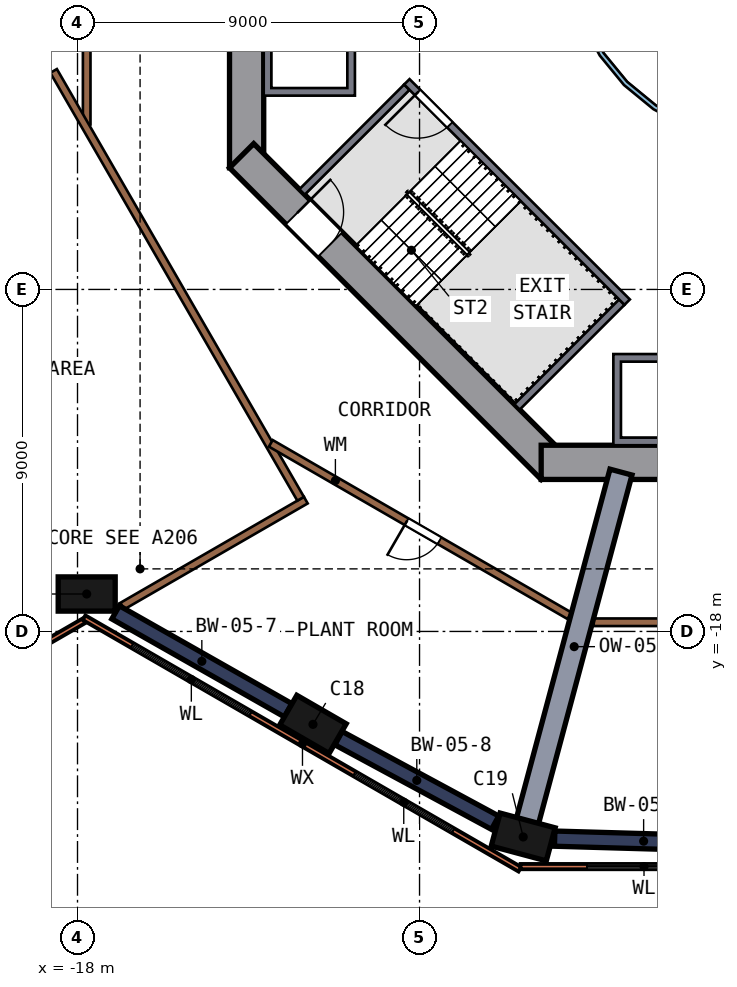
"""IFC4 building model, lengths in metres.
Left out: names, types, materials, properties, quantities, classifications, styles, units other than length and angle.
Written with IfcOpenShell. Run it as: python <this file> out.ifc"""

import sys

from ifc_helpers import new_model, si_unit, direction, frame, frame_2d, origin, origin_2d, place, context, subcontext, project, spatial, polyline, rectangle, outline, extrude, element, fill, save


model = new_model("IFC4")
c1 = context("Model", 3, precision=1e-05, world=origin(), true_north=direction((0.0, 1.0)))
c2 = subcontext(c1, "Body", "Model", "MODEL_VIEW")
j1 = project(units=[si_unit("LENGTHUNIT", "METRE"), si_unit("PLANEANGLEUNIT", "RADIAN")], contexts=[c1])
p1 = place(None, origin())
s1 = spatial("IfcSite", under=j1, at=p1, CompositionType="ELEMENT")
p2 = place(p1, origin())
s2 = spatial("IfcBuilding", under=s1, at=p2, CompositionType="ELEMENT")
p3 = place(p2, frame((0.0, 0.0, 28.0)))
s3 = spatial("IfcBuildingStorey", under=s2, at=p3, CompositionType="ELEMENT", Elevation=28.0)
p4 = place(p3, frame((-17.758, -17.065, 0.0), z_axis=(0.0, 0.042279868, 0.999105807), x_axis=(-1.0, 0.0, 0.0)))
e1 = element("IfcColumn", 1, at=p4, inside=s3, PredefinedType="COLUMN", context=c2, shape_type="SweptSolid", body=[
    extrude(rectangle(XDim=1.5, YDim=0.9, at=origin_2d()), origin(), (0.0, 0.0, 1.0), 4.504),
])
p5 = place(p3, frame((-11.804, -20.445, 0.0), z_axis=(0.0, 0.0, 1.0), x_axis=(0.866025404, -0.5, 0.0)))
e2 = element("IfcColumn", 2, at=p5, inside=s3, PredefinedType="COLUMN", context=c2, shape_type="SweptSolid", body=[
    extrude(rectangle(XDim=1.5, YDim=0.9, at=origin_2d()), origin(), (0.0, 0.0, 1.0), 4.5),
])
p6 = place(p3, frame((-6.278, -23.428, 0.0), z_axis=(0.004448124, 0.016653341, 0.999851429), x_axis=(-0.966130395, 0.258054373, 0.0)))
e3 = element("IfcColumn", 3, at=p6, inside=s3, PredefinedType="COLUMN", context=c2, shape_type="SweptSolid", body=[
    extrude(rectangle(XDim=1.5, YDim=0.9, at=origin_2d()), origin(), (0.0, 0.0, 1.0), 4.501),
])
p7 = place(p3, frame((-13.55, 5.799, 0.0), z_axis=(0.0, 0.0, 1.0), x_axis=(0.0, -1.0, 0.0)))
e4 = element("IfcWall", 4, at=p7, inside=s3, PredefinedType="SHEAR", context=c2, shape_type="SweptSolid", body=[
    extrude(rectangle(XDim=11.598, YDim=0.9, at=frame_2d((5.799, 0.0))), origin(), (0.0, 0.0, 1.0), 6.0),
])
p8 = place(p7, frame((4.899, 0.0, 0.0)))
e5 = element("IfcOpeningElement", 5, at=p8, cuts=e4, PredefinedType="OPENING", context=c2, shape_type="SweptSolid", body=[
    extrude(rectangle(XDim=1.8, YDim=2.1, at=frame_2d((0.9, 1.05))), frame((0.0, 0.46, 0.0), z_axis=(0.0, -1.0, 0.0), x_axis=(1.0, 0.0, 0.0)), (0.0, 0.0, 1.0), 0.92),
])
p9 = place(p3, frame((-13.682, -5.481, 0.0), z_axis=(0.0, 0.0, 1.0), x_axis=(0.707106781, -0.707106781, 0.0)))
e6 = element("IfcWall", 6, at=p9, inside=s3, PredefinedType="SHEAR", context=c2, shape_type="SweptSolid", body=[
    extrude(rectangle(XDim=11.598, YDim=0.9, at=frame_2d((5.799, 0.0))), origin(), (0.0, 0.0, 1.0), 6.0),
])
p10 = place(p9, frame((2.099, 0.0, 0.0)))
e7 = element("IfcOpeningElement", 7, at=p10, cuts=e6, PredefinedType="OPENING", context=c2, shape_type="SweptSolid", body=[
    extrude(rectangle(XDim=1.2, YDim=2.1, at=frame_2d((0.6, 1.05))), frame((0.0, 0.46, 0.0), z_axis=(0.0, -1.0, 0.0), x_axis=(1.0, 0.0, 0.0)), (0.0, 0.0, 1.0), 0.92),
])
p11 = place(p3, frame((-5.799, -13.55, 0.0), z_axis=(0.0, 0.0, 1.0), x_axis=(1.0, 0.0, 0.0)))
e8 = element("IfcWall", 8, at=p11, inside=s3, PredefinedType="SHEAR", context=c2, shape_type="SweptSolid", body=[
    extrude(rectangle(XDim=11.598, YDim=0.9, at=frame_2d((5.799, 0.0))), origin(), (0.0, 0.0, 1.0), 6.0),
])
p12 = place(p11, frame((4.899, 0.0, 0.0)))
e9 = element("IfcOpeningElement", 9, at=p12, cuts=e8, PredefinedType="OPENING", context=c2, shape_type="SweptSolid", body=[
    extrude(rectangle(XDim=1.8, YDim=2.1, at=frame_2d((0.9, 1.05))), frame((0.0, 0.46, 0.0), z_axis=(0.0, -1.0, 0.0), x_axis=(1.0, 0.0, 0.0)), (0.0, 0.0, 1.0), 0.92),
])
p13 = place(p3, frame((-16.998, -17.497, 0.0), z_axis=(0.0, 0.0, 1.0), x_axis=(0.869667461, -0.493638034, 0.0)))
e10 = element("IfcWall", 10, at=p13, inside=s3, PredefinedType="SHEAR", context=c2, shape_type="SweptSolid", body=[
    extrude(rectangle(XDim=5.219, YDim=0.4, at=frame_2d((2.609, 0.0))), origin(), (0.0, 0.0, 1.0), 4.5),
])
p14 = place(p3, frame((-11.133, -20.808, 0.0), z_axis=(0.0, 0.0, 1.0), x_axis=(0.879988629, -0.474994751, 0.0)))
e11 = element("IfcWall", 11, at=p14, inside=s3, PredefinedType="SHEAR", context=c2, shape_type="SweptSolid", body=[
    extrude(rectangle(XDim=4.684, YDim=0.4, at=frame_2d((2.342, 0.0))), origin(), (0.0, 0.0, 1.0), 4.5),
])
p15 = place(p3, frame((-5.444, -23.452, 0.0), z_axis=(0.0, 0.0, 1.0), x_axis=(0.99958902, -0.028666908, 0.0)))
e12 = element("IfcWall", 12, at=p15, inside=s3, PredefinedType="SHEAR", context=c2, shape_type="SweptSolid", body=[
    extrude(rectangle(XDim=4.684, YDim=0.4, at=frame_2d((2.342, 0.0))), origin(), (0.0, 0.0, 1.0), 4.5),
])
p16 = place(p3, frame((-3.699, -13.807, 0.0), z_axis=(0.0, 0.0, 1.0), x_axis=(-0.258827184, -0.965923645, 0.0)))
e13 = element("IfcWall", 13, at=p16, inside=s3, PredefinedType="SHEAR", context=c2, shape_type="SweptSolid", body=[
    extrude(rectangle(XDim=9.511, YDim=0.6, at=frame_2d((4.755, 0.0))), origin(), (0.0, 0.0, 1.0), 4.5),
])
p17 = place(p3, frame((-27.321, -23.198, 0.0), z_axis=(0.0, 0.0, 1.0), x_axis=(0.866030546, 0.499991093, 0.0)))
e14 = element("IfcWall", 14, at=p17, inside=s3, PredefinedType="SOLIDWALL", context=c2, shape_type="SweptSolid", body=[
    extrude(rectangle(XDim=10.961, YDim=0.14, at=frame_2d((5.48, 0.0))), origin(), (0.0, 0.0, 1.0), 4.5),
])
p18 = place(p17, frame((6.702, 0.0, 0.9)))
e15 = element("IfcOpeningElement", 15, at=p18, cuts=e14, PredefinedType="OPENING", context=c2, shape_type="SweptSolid", body=[
    extrude(rectangle(XDim=3.0, YDim=3.3, at=frame_2d((1.5, 1.65))), frame((0.0, 0.08, 0.0), z_axis=(0.0, -1.0, 0.0), x_axis=(1.0, 0.0, 0.0)), (0.0, 0.0, 1.0), 0.16),
])
p19 = place(p3, frame((-17.828, -17.637, 0.0), z_axis=(0.0, 0.0, 1.0), x_axis=(0.866029009, -0.499993756, 0.0)))
e16 = element("IfcWall", 16, at=p19, inside=s3, PredefinedType="SOLIDWALL", context=c2, shape_type="SweptSolid", body=[
    extrude(rectangle(XDim=13.242, YDim=0.14, at=frame_2d((6.621, 0.0))), origin(), (0.0, 0.0, 1.0), 4.5),
])
p20 = place(p19, frame((1.46, 0.0, 0.9)))
e17 = element("IfcOpeningElement", 17, at=p20, cuts=e16, PredefinedType="OPENING", context=c2, shape_type="SweptSolid", body=[
    extrude(rectangle(XDim=3.6, YDim=3.3, at=frame_2d((1.8, 1.65))), frame((0.0, 0.08, 0.0), z_axis=(0.0, -1.0, 0.0), x_axis=(1.0, 0.0, 0.0)), (0.0, 0.0, 1.0), 0.16),
])
p21 = place(p19, frame((8.215, 0.0, 0.9)))
e18 = element("IfcOpeningElement", 18, at=p21, cuts=e16, PredefinedType="OPENING", context=c2, shape_type="SweptSolid", body=[
    extrude(rectangle(XDim=3.0, YDim=3.3, at=frame_2d((1.5, 1.65))), frame((0.0, 0.08, 0.0), z_axis=(0.0, -1.0, 0.0), x_axis=(1.0, 0.0, 0.0)), (0.0, 0.0, 1.0), 0.16),
])
p22 = place(p3, frame((-6.341, -24.188, 0.0), z_axis=(0.0, 0.0, 1.0), x_axis=(1.0, 0.0, 0.0)))
e19 = element("IfcWall", 19, at=p22, inside=s3, PredefinedType="SOLIDWALL", context=c2, shape_type="SweptSolid", body=[
    extrude(rectangle(XDim=12.962, YDim=0.14, at=frame_2d((6.481, 0.0))), origin(), (0.0, 0.0, 1.0), 4.5),
])
p23 = place(p22, frame((1.748, 0.0, 0.9)))
e20 = element("IfcOpeningElement", 20, at=p23, cuts=e19, PredefinedType="OPENING", context=c2, shape_type="SweptSolid", body=[
    extrude(rectangle(XDim=3.0, YDim=3.3, at=frame_2d((1.5, 1.65))), frame((0.0, 0.08, 0.0), z_axis=(0.0, -1.0, 0.0), x_axis=(1.0, 0.0, 0.0)), (0.0, 0.0, 1.0), 0.16),
])
p24 = place(p22, frame((7.935, 0.0, 0.9)))
e21 = element("IfcOpeningElement", 21, at=p24, cuts=e19, PredefinedType="OPENING", context=c2, shape_type="SweptSolid", body=[
    extrude(rectangle(XDim=3.0, YDim=3.3, at=frame_2d((1.5, 1.65))), frame((0.0, 0.08, 0.0), z_axis=(0.0, -1.0, 0.0), x_axis=(1.0, 0.0, 0.0)), (0.0, 0.0, 1.0), 0.16),
])
p25 = place(p3, origin())
e22 = element("IfcWall", 22, at=p25, inside=s3, PredefinedType="SOLIDWALL", context=c2, shape_type="SweptSolid", body=[
    extrude(outline(polyline([(-10.7, -3.9), (-13.1, -3.9), (-13.1, -1.2), (-10.7, -1.2), (-10.7, -3.9)]), holes=[polyline([(-12.9, -1.4), (-12.9, -3.7), (-10.9, -3.7), (-10.9, -1.4), (-12.9, -1.4)])]), origin(), (0.0, 0.0, 1.0), 5.55),
])
p26 = place(p3, origin())
e23 = element("IfcWall", 23, at=p26, inside=s3, PredefinedType="SOLIDWALL", context=c2, shape_type="SweptSolid", body=[
    extrude(outline(polyline([(-1.2, -13.1), (-3.9, -13.1), (-3.9, -10.7), (-1.2, -10.7), (-1.2, -13.1)]), holes=[polyline([(-3.7, -10.9), (-3.7, -12.9), (-1.4, -12.9), (-1.4, -10.9), (-3.7, -10.9)])]), origin(), (0.0, 0.0, 1.0), 5.55),
])
p27 = place(p3, frame((-3.535, -9.334, 0.0), z_axis=(0.0, 0.0, 1.0), x_axis=(-0.707106781, 0.707106781, 0.0)))
e24 = element("IfcWall", 24, at=p27, inside=s3, PredefinedType="SOLIDWALL", context=c2, shape_type="SweptSolid", body=[
    extrude(rectangle(XDim=8.2, YDim=0.2, at=frame_2d((4.1, 0.0))), origin(), (0.0, 0.0, 1.0), 5.55),
])
p28 = place(p27, frame((6.6, 0.0, 0.0)))
e25 = element("IfcOpeningElement", 25, at=p28, cuts=e24, PredefinedType="OPENING", context=c2, shape_type="SweptSolid", body=[
    extrude(rectangle(XDim=1.2, YDim=2.1, at=frame_2d((0.6, 1.05))), frame((0.0, 0.11, 0.0), z_axis=(0.0, -1.0, 0.0), x_axis=(1.0, 0.0, 0.0)), (0.0, 0.0, 1.0), 0.22),
])
for number, where, z_axis, x_axis in (
    (26, (-9.334, -3.677, 0.0), (0.0, 0.0, 1.0), (-0.707, -0.707, 0.0)),
    (27, (-3.677, -9.334, 0.0), (0.0, 0.0, 1.0), (-0.707, -0.707, 0.0)),
):
    element("IfcWall", number, at=place(p3, frame(where, z_axis=z_axis, x_axis=x_axis)), inside=s3, PredefinedType="SOLIDWALL", context=c2, shape_type="SweptSolid", body=[
        extrude(rectangle(XDim=3.9, YDim=0.2, at=frame_2d((1.95, 0.0))), origin(), (0.0, 0.0, 1.0), 5.55),
    ])
p29 = place(p3, origin())
e28 = element("IfcWall", 28, at=p29, inside=s3, PredefinedType="SOLIDWALL", context=c2, shape_type="SweptSolid", body=[
    extrude(outline(polyline([(5.021, -0.999), (4.73, -1.959), (4.257, -2.844), (3.62, -3.62), (2.844, -4.257), (1.959, -4.73), (0.999, -5.021), (0.0, -5.12), (-0.999, -5.021), (-1.959, -4.73), (-2.844, -4.257), (-3.62, -3.62), (-4.257, -2.844), (-4.73, -1.959), (-5.021, -0.999), (-5.12, 0.0), (-5.021, 0.999), (-4.73, 1.959), (-4.257, 2.844), (-3.62, 3.62), (-2.844, 4.257), (-1.959, 4.73), (-0.999, 5.021), (0.0, 5.12), (0.999, 5.021), (1.959, 4.73), (2.844, 4.257), (3.62, 3.62), (4.257, 2.844), (4.73, 1.959), (5.021, 0.999), (5.12, 0.0), (5.021, -0.999)]), holes=[polyline([(4.904, 0.976), (4.619, 1.913), (4.157, 2.778), (3.535, 3.535), (2.778, 4.157), (1.913, 4.619), (0.976, 4.904), (0.0, 5.0), (-0.976, 4.904), (-1.913, 4.619), (-2.778, 4.157), (-3.535, 3.535), (-4.157, 2.778), (-4.619, 1.913), (-4.904, 0.976), (-5.0, 0.0), (-4.904, -0.976), (-4.619, -1.913), (-4.157, -2.778), (-3.535, -3.535), (-2.778, -4.157), (-1.913, -4.619), (-0.976, -4.904), (0.0, -5.0), (0.976, -4.904), (1.913, -4.619), (2.778, -4.157), (3.535, -3.535), (4.157, -2.778), (4.619, -1.913), (4.904, -0.976), (5.0, 0.0), (4.904, 0.976)])]), origin(), (0.0, 0.0, 1.0), 5.55),
])
p30 = place(p3, frame((-17.758, -4.658, 0.0), z_axis=(0.0, 0.0, 1.0), x_axis=(0.0, 1.0, 0.0)))
e29 = element("IfcWall", 29, at=p30, inside=s3, PredefinedType="SOLIDWALL", context=c2, shape_type="SweptSolid", body=[
    extrude(rectangle(XDim=9.075, YDim=0.2, at=frame_2d((4.538, 0.0))), origin(), (0.0, 0.0, 1.0), 4.5),
])
p31 = place(p30, frame((3.95, 0.0, 0.0)))
e30 = element("IfcOpeningElement", 30, at=p31, cuts=e29, PredefinedType="OPENING", context=c2, shape_type="SweptSolid", body=[
    extrude(rectangle(XDim=1.0, YDim=2.1, at=frame_2d((0.5, 1.05))), frame((0.0, 0.11, 0.0), z_axis=(0.0, -1.0, 0.0), x_axis=(1.0, 0.0, 0.0)), (0.0, 0.0, 1.0), 0.22),
])
p32 = place(p3, frame((-16.821, -17.333, 0.0), z_axis=(0.0, 0.0, 1.0), x_axis=(0.866003288, 0.500038303, 0.0)))
e31 = element("IfcWall", 31, at=p32, inside=s3, PredefinedType="SOLIDWALL", context=c2, shape_type="SweptSolid", body=[
    extrude(rectangle(XDim=5.576, YDim=0.2, at=frame_2d((2.788, 0.0))), origin(), (0.0, 0.0, 1.0), 4.5),
])
p33 = place(p3, frame((-12.129, -14.508, 0.0), z_axis=(0.0, 0.0, 1.0), x_axis=(-0.500000982, 0.866024837, 0.0)))
e32 = element("IfcWall", 32, at=p33, inside=s3, PredefinedType="SOLIDWALL", context=c2, shape_type="SweptSolid", body=[
    extrude(rectangle(XDim=13.0, YDim=0.2, at=frame_2d((6.5, 0.0))), origin(), (0.0, 0.0, 1.0), 4.5),
])
p34 = place(p3, frame((-5.054, -17.587, 0.0), z_axis=(0.0, 0.0, 1.0), x_axis=(-0.866031025, 0.499990264, 0.0)))
e33 = element("IfcWall", 33, at=p34, inside=s3, PredefinedType="SOLIDWALL", context=c2, shape_type="SweptSolid", body=[
    extrude(rectangle(XDim=9.075, YDim=0.2, at=frame_2d((4.538, 0.0))), origin(), (0.0, 0.0, 1.0), 4.5),
])
p35 = place(p34, frame((3.95, 0.0, 0.0)))
e34 = element("IfcOpeningElement", 34, at=p35, cuts=e33, PredefinedType="OPENING", context=c2, shape_type="SweptSolid", body=[
    extrude(rectangle(XDim=1.0, YDim=2.1, at=frame_2d((0.5, 1.05))), frame((0.0, 0.11, 0.0), z_axis=(0.0, -1.0, 0.0), x_axis=(1.0, 0.0, 0.0)), (0.0, 0.0, 1.0), 0.22),
])
p36 = place(p3, frame((4.417, -17.758, 0.0), z_axis=(0.0, 0.0, 1.0), x_axis=(-1.0, 0.0, 0.0)))
e35 = element("IfcWall", 35, at=p36, inside=s3, PredefinedType="SOLIDWALL", context=c2, shape_type="SweptSolid", body=[
    extrude(rectangle(XDim=8.833, YDim=0.2, at=frame_2d((4.417, 0.0))), origin(), (0.0, 0.0, 1.0), 4.5),
])
p37 = place(p36, frame((3.75, 0.0, 0.0)))
e36 = element("IfcOpeningElement", 36, at=p37, cuts=e35, PredefinedType="OPENING", context=c2, shape_type="SweptSolid", body=[
    extrude(rectangle(XDim=1.0, YDim=2.1, at=frame_2d((0.5, 1.05))), frame((0.0, 0.11, 0.0), z_axis=(0.0, -1.0, 0.0), x_axis=(1.0, 0.0, 0.0)), (0.0, 0.0, 1.0), 0.22),
])
p38 = place(p20, origin())
e37 = element("IfcWindow", 37, at=p38, inside=s3, PartitioningType="SINGLE_PANEL", PredefinedType="WINDOW", context=c2, shape_type="SweptSolid", body=[
    extrude(rectangle(XDim=3.6, YDim=3.3, at=frame_2d((1.8, 1.65))), frame((0.0, 0.03, 0.0), z_axis=(0.0, -1.0, 0.0), x_axis=(1.0, 0.0, 0.0)), (0.0, 0.0, 1.0), 0.06),
])
fill(e17, e37)
p39 = place(p21, origin())
e38 = element("IfcWindow", 38, at=p39, inside=s3, PartitioningType="SINGLE_PANEL", PredefinedType="WINDOW", context=c2, shape_type="SweptSolid", body=[
    extrude(rectangle(XDim=3.0, YDim=3.3, at=frame_2d((1.5, 1.65))), frame((0.0, 0.03, 0.0), z_axis=(0.0, -1.0, 0.0), x_axis=(1.0, 0.0, 0.0)), (0.0, 0.0, 1.0), 0.06),
])
fill(e18, e38)
p40 = place(p23, origin())
e39 = element("IfcWindow", 39, at=p40, inside=s3, PartitioningType="SINGLE_PANEL", PredefinedType="WINDOW", context=c2, shape_type="SweptSolid", body=[
    extrude(rectangle(XDim=3.0, YDim=3.3, at=frame_2d((1.5, 1.65))), frame((0.0, 0.03, 0.0), z_axis=(0.0, -1.0, 0.0), x_axis=(1.0, 0.0, 0.0)), (0.0, 0.0, 1.0), 0.06),
])
fill(e20, e39)
p41 = place(p28, origin())
e40 = element("IfcDoor", 40, at=p41, inside=s3, OperationType="SINGLE_SWING_RIGHT", PredefinedType="DOOR", context=c2, shape_type="SweptSolid", body=[
    extrude(rectangle(XDim=1.2, YDim=2.1, at=frame_2d((0.6, 1.05))), frame((0.0, 0.025, 0.0), z_axis=(0.0, -1.0, 0.0), x_axis=(1.0, 0.0, 0.0)), (0.0, 0.0, 1.0), 0.05),
])
fill(e25, e40)
p42 = place(p10, origin())
e41 = element("IfcDoor", 41, at=p42, inside=s3, OperationType="SINGLE_SWING_LEFT", PredefinedType="DOOR", context=c2, shape_type="SweptSolid", body=[
    extrude(rectangle(XDim=1.2, YDim=2.1, at=frame_2d((0.6, 1.05))), frame((0.0, 0.025, 0.0), z_axis=(0.0, -1.0, 0.0), x_axis=(1.0, 0.0, 0.0)), (0.0, 0.0, 1.0), 0.05),
])
fill(e7, e41)
p43 = place(p35, origin())
e42 = element("IfcDoor", 42, at=p43, inside=s3, OperationType="SINGLE_SWING_RIGHT", PredefinedType="DOOR", context=c2, shape_type="SweptSolid", body=[
    extrude(rectangle(XDim=1.0, YDim=2.1, at=frame_2d((0.5, 1.05))), frame((0.0, 0.025, 0.0), z_axis=(0.0, -1.0, 0.0), x_axis=(1.0, 0.0, 0.0)), (0.0, 0.0, 1.0), 0.05),
])
fill(e34, e42)
save(model, sys.argv[1])
